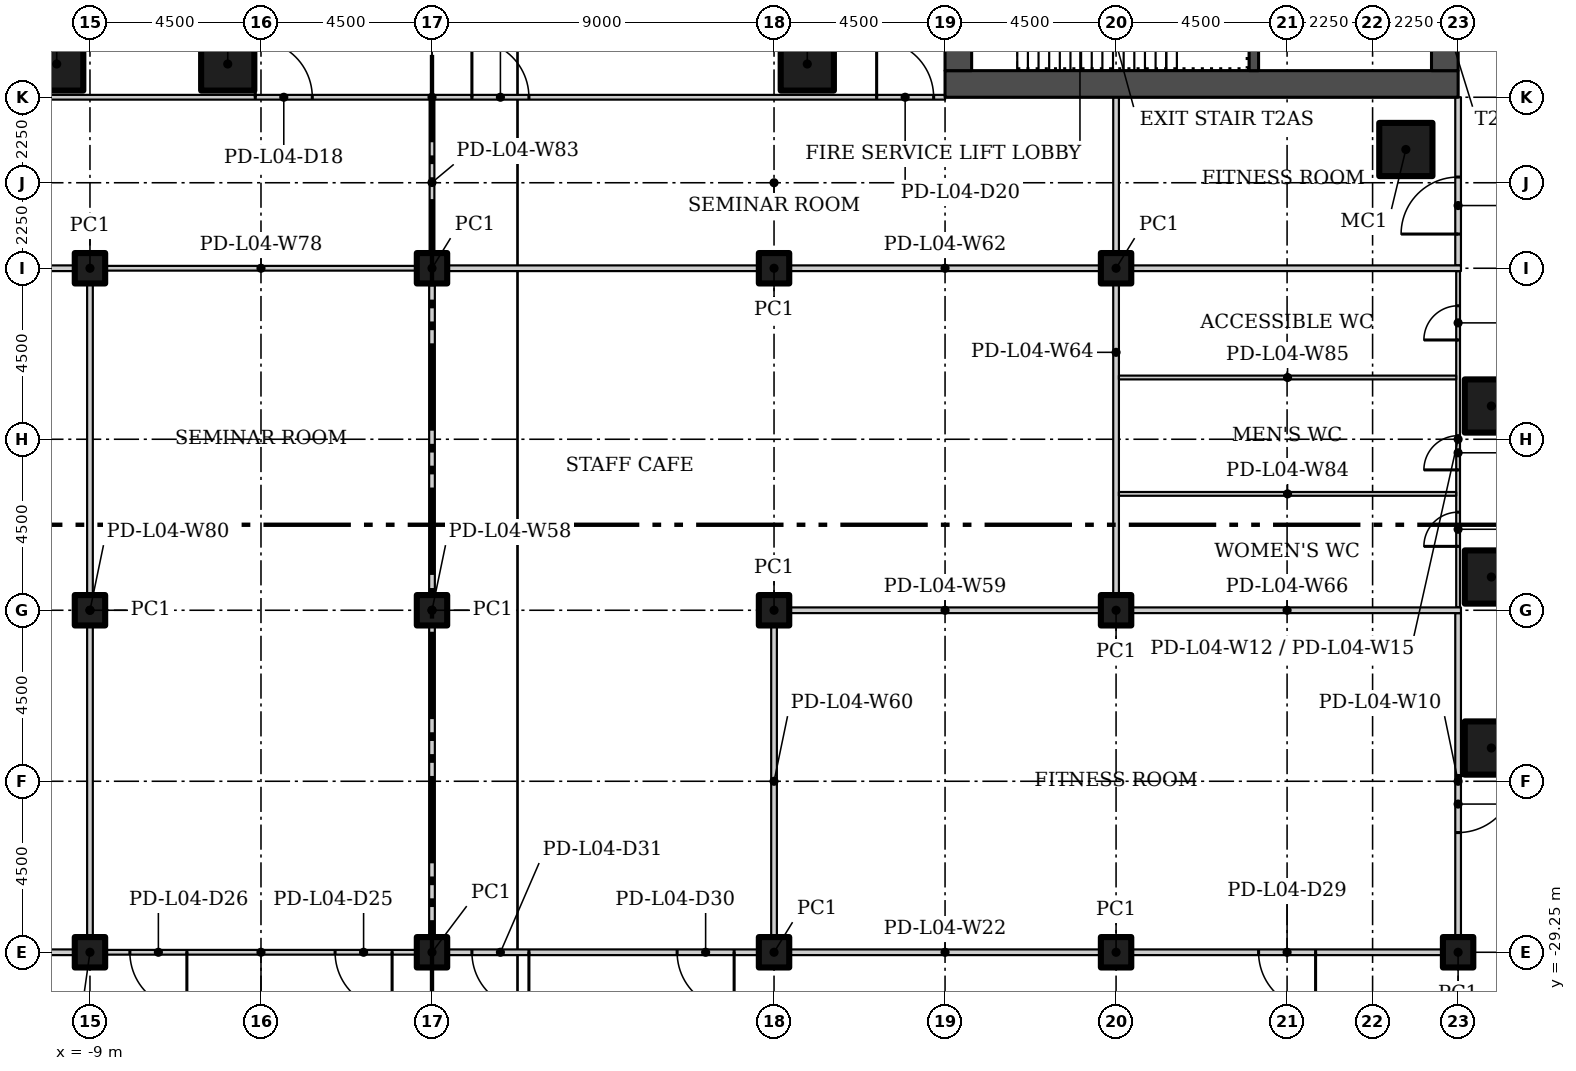
"""IFC4 building model, lengths in metres.
Left out: names, types, materials, properties, quantities, classifications, styles, units other than length and angle.
Written with IfcOpenShell. Run it as: python <this file> out.ifc"""

import sys

from ifc_helpers import new_model, si_unit, direction, frame, frame_2d, origin, origin_2d, place, context, subcontext, project, spatial, rectangle, hollow_rectangle, extrude, element, fill, save


model = new_model("IFC4")
c1 = context("Model", 3, precision=1e-05, world=origin(), true_north=direction((0.0, 1.0)))
c2 = subcontext(c1, "Body", "Model", "MODEL_VIEW")
j1 = project(units=[si_unit("LENGTHUNIT", "METRE"), si_unit("PLANEANGLEUNIT", "RADIAN")], contexts=[c1])
p1 = place(None, origin())
s1 = spatial("IfcSite", under=j1, at=p1, CompositionType="ELEMENT")
p2 = place(p1, origin())
s2 = spatial("IfcBuilding", under=s1, at=p2, CompositionType="ELEMENT")
p3 = place(p2, frame((0.0, 0.0, 23.5)))
s3 = spatial("IfcBuildingStorey", under=s2, at=p3, CompositionType="ELEMENT", Elevation=23.5)
for number, where in (
    (1, (-9.875, -5.875, 0.0)),
    (2, (-5.375, -5.875, 0.0)),
    (3, (25.625, -8.125, 0.0)),
    (4, (27.875, -14.875, 0.0)),
    (5, (27.875, -19.375, 0.0)),
    (6, (27.875, -23.875, 0.0)),
    (7, (9.875, -5.875, 0.0)),
):
    element("IfcColumn", number, at=place(p3, frame(where)), inside=s3, PredefinedType="COLUMN", context=c2, shape_type="SweptSolid", body=[
        extrude(hollow_rectangle(XDim=1.4, YDim=1.4, WallThickness=0.06, at=origin_2d()), origin(), (0.0, 0.0, 1.0), 4.65),
    ])
for number, where in (
    (8, (-9.0, -29.25, 0.0)),
    (9, (-9.0, -20.25, 0.0)),
    (10, (-9.0, -11.25, 0.0)),
    (11, (0.0, -29.25, 0.0)),
    (12, (0.0, -20.25, 0.0)),
    (13, (0.0, -11.25, 0.0)),
    (14, (9.0, -29.25, 0.0)),
    (15, (9.0, -20.25, 0.0)),
    (16, (9.0, -11.25, 0.0)),
    (17, (18.0, -29.25, 0.0)),
    (18, (18.0, -20.25, 0.0)),
    (19, (18.0, -11.25, 0.0)),
    (20, (27.0, -29.25, 0.0)),
):
    element("IfcColumn", number, at=place(p3, frame(where)), inside=s3, PredefinedType="COLUMN", context=c2, shape_type="SweptSolid", body=[
        extrude(hollow_rectangle(XDim=0.8, YDim=0.8, WallThickness=0.03, at=origin_2d()), origin(), (0.0, 0.0, 1.0), 4.65),
    ])
p4 = place(p3, frame((27.0, -20.325, 0.0), z_axis=(0.0, 0.0, 1.0), x_axis=(0.0, -1.0, 0.0)))
e21 = element("IfcWall", 21, at=p4, inside=s3, PredefinedType="PARTITIONING", context=c2, shape_type="SweptSolid", body=[
    extrude(rectangle(XDim=8.85, YDim=0.15, at=frame_2d((4.425, 0.0))), origin(), (0.0, 0.0, 1.0), 4.65),
])
p5 = place(p4, frame((4.275, 0.0, 0.0)))
e22 = element("IfcOpeningElement", 22, at=p5, cuts=e21, PredefinedType="OPENING", context=c2, shape_type="SweptSolid", body=[
    extrude(rectangle(XDim=1.5, YDim=2.1, at=frame_2d((0.75, 1.05))), frame((0.0, 0.085, 0.0), z_axis=(0.0, -1.0, 0.0), x_axis=(1.0, 0.0, 0.0)), (0.0, 0.0, 1.0), 0.17),
])
p6 = place(p3, frame((27.0, -20.175, 0.0), z_axis=(0.0, 0.0, 1.0), x_axis=(0.0, 1.0, 0.0)))
e23 = element("IfcWall", 23, at=p6, inside=s3, PredefinedType="PARTITIONING", context=c2, shape_type="SweptSolid", body=[
    extrude(rectangle(XDim=8.85, YDim=0.1, at=frame_2d((4.425, 0.0))), origin(), (0.0, 0.0, 1.0), 4.65),
])
p7 = place(p6, frame((1.606, 0.0, 0.0)))
e24 = element("IfcOpeningElement", 24, at=p7, cuts=e23, PredefinedType="OPENING", context=c2, shape_type="SweptSolid", body=[
    extrude(rectangle(XDim=0.9, YDim=2.1, at=frame_2d((0.45, 1.05))), frame((0.0, 0.06, 0.0), z_axis=(0.0, -1.0, 0.0), x_axis=(1.0, 0.0, 0.0)), (0.0, 0.0, 1.0), 0.12),
])
p8 = place(p6, frame((3.619, 0.0, 0.0)))
e25 = element("IfcOpeningElement", 25, at=p8, cuts=e23, PredefinedType="OPENING", context=c2, shape_type="SweptSolid", body=[
    extrude(rectangle(XDim=0.9, YDim=2.1, at=frame_2d((0.45, 1.05))), frame((0.0, 0.06, 0.0), z_axis=(0.0, -1.0, 0.0), x_axis=(1.0, 0.0, 0.0)), (0.0, 0.0, 1.0), 0.12),
])
p9 = place(p6, frame((7.038, 0.0, 0.0)))
e26 = element("IfcOpeningElement", 26, at=p9, cuts=e23, PredefinedType="OPENING", context=c2, shape_type="SweptSolid", body=[
    extrude(rectangle(XDim=0.9, YDim=2.1, at=frame_2d((0.45, 1.05))), frame((0.0, 0.06, 0.0), z_axis=(0.0, -1.0, 0.0), x_axis=(1.0, 0.0, 0.0)), (0.0, 0.0, 1.0), 0.12),
])
p10 = place(p3, frame((27.0, -11.175, 0.0), z_axis=(0.0, 0.0, 1.0), x_axis=(0.0, 1.0, 0.0)))
e27 = element("IfcWall", 27, at=p10, inside=s3, PredefinedType="PARTITIONING", context=c2, shape_type="SweptSolid", body=[
    extrude(rectangle(XDim=4.425, YDim=0.15, at=frame_2d((2.212, 0.0))), origin(), (0.0, 0.0, 1.0), 4.65),
])
p11 = place(p10, frame((0.825, 0.0, 0.0)))
e28 = element("IfcOpeningElement", 28, at=p11, cuts=e27, PredefinedType="OPENING", context=c2, shape_type="SweptSolid", body=[
    extrude(rectangle(XDim=1.5, YDim=2.1, at=frame_2d((0.75, 1.05))), frame((0.0, 0.085, 0.0), z_axis=(0.0, -1.0, 0.0), x_axis=(1.0, 0.0, 0.0)), (0.0, 0.0, 1.0), 0.17),
])
p12 = place(p3, frame((-13.5, -6.75, 0.0)))
e29 = element("IfcWall", 29, at=p12, inside=s3, PredefinedType="PARTITIONING", context=c2, shape_type="SweptSolid", body=[
    extrude(rectangle(XDim=27.0, YDim=0.125, at=frame_2d((13.5, 0.0))), origin(), (0.0, 0.0, 1.0), 4.65),
])
p13 = place(p12, frame((8.85, 0.0, 0.0)))
e30 = element("IfcOpeningElement", 30, at=p13, cuts=e29, PredefinedType="OPENING", context=c2, shape_type="SweptSolid", body=[
    extrude(rectangle(XDim=1.5, YDim=2.1, at=frame_2d((0.75, 1.05))), frame((0.0, 0.073, 0.0), z_axis=(0.0, -1.0, 0.0), x_axis=(1.0, 0.0, 0.0)), (0.0, 0.0, 1.0), 0.145),
])
p14 = place(p12, frame((14.55, 0.0, 0.0)))
e31 = element("IfcOpeningElement", 31, at=p14, cuts=e29, PredefinedType="OPENING", context=c2, shape_type="SweptSolid", body=[
    extrude(rectangle(XDim=1.5, YDim=2.1, at=frame_2d((0.75, 1.05))), frame((0.0, 0.073, 0.0), z_axis=(0.0, -1.0, 0.0), x_axis=(1.0, 0.0, 0.0)), (0.0, 0.0, 1.0), 0.145),
])
p15 = place(p12, frame((25.2, 0.0, 0.0)))
e32 = element("IfcOpeningElement", 32, at=p15, cuts=e29, PredefinedType="OPENING", context=c2, shape_type="SweptSolid", body=[
    extrude(rectangle(XDim=1.5, YDim=2.1, at=frame_2d((0.75, 1.05))), frame((0.0, 0.073, 0.0), z_axis=(0.0, -1.0, 0.0), x_axis=(1.0, 0.0, 0.0)), (0.0, 0.0, 1.0), 0.145),
])
p16 = place(p3, frame((27.075, -29.25, 0.0), z_axis=(0.0, 0.0, 1.0), x_axis=(-1.0, 0.0, 0.0)))
e33 = element("IfcWall", 33, at=p16, inside=s3, PredefinedType="PARTITIONING", context=c2, shape_type="SweptSolid", body=[
    extrude(rectangle(XDim=27.15, YDim=0.15, at=frame_2d((13.575, 0.0))), origin(), (0.0, 0.0, 1.0), 4.65),
])
p17 = place(p16, frame((3.825, 0.0, 0.0)))
e34 = element("IfcOpeningElement", 34, at=p17, cuts=e33, PredefinedType="OPENING", context=c2, shape_type="SweptSolid", body=[
    extrude(rectangle(XDim=1.5, YDim=2.1, at=frame_2d((0.75, 1.05))), frame((0.0, 0.085, 0.0), z_axis=(0.0, -1.0, 0.0), x_axis=(1.0, 0.0, 0.0)), (0.0, 0.0, 1.0), 0.17),
])
p18 = place(p16, frame((19.125, 0.0, 0.0)))
e35 = element("IfcOpeningElement", 35, at=p18, cuts=e33, PredefinedType="OPENING", context=c2, shape_type="SweptSolid", body=[
    extrude(rectangle(XDim=1.5, YDim=2.1, at=frame_2d((0.75, 1.05))), frame((0.0, 0.085, 0.0), z_axis=(0.0, -1.0, 0.0), x_axis=(1.0, 0.0, 0.0)), (0.0, 0.0, 1.0), 0.17),
])
p19 = place(p16, frame((24.525, 0.0, 0.0)))
e36 = element("IfcOpeningElement", 36, at=p19, cuts=e33, PredefinedType="OPENING", context=c2, shape_type="SweptSolid", body=[
    extrude(rectangle(XDim=1.5, YDim=2.1, at=frame_2d((0.75, 1.05))), frame((0.0, 0.085, 0.0), z_axis=(0.0, -1.0, 0.0), x_axis=(1.0, 0.0, 0.0)), (0.0, 0.0, 1.0), 0.17),
])
p20 = place(p3, frame((-8.925, -29.25, 0.0), z_axis=(0.0, 0.0, 1.0), x_axis=(-1.0, 0.0, 0.0)))
e37 = element("IfcWall", 37, at=p20, inside=s3, PredefinedType="PARTITIONING", context=c2, shape_type="SweptSolid", body=[
    extrude(rectangle(XDim=9.15, YDim=0.15, at=frame_2d((4.575, 0.0))), origin(), (0.0, 0.0, 1.0), 4.65),
])
p21 = place(p20, frame((1.125, 0.0, 0.0)))
e38 = element("IfcOpeningElement", 38, at=p21, cuts=e37, PredefinedType="OPENING", context=c2, shape_type="SweptSolid", body=[
    extrude(rectangle(XDim=1.5, YDim=2.1, at=frame_2d((0.75, 1.05))), frame((0.0, 0.085, 0.0), z_axis=(0.0, -1.0, 0.0), x_axis=(1.0, 0.0, 0.0)), (0.0, 0.0, 1.0), 0.17),
])
p22 = place(p20, frame((6.525, 0.0, 0.0)))
e39 = element("IfcOpeningElement", 39, at=p22, cuts=e37, PredefinedType="OPENING", context=c2, shape_type="SweptSolid", body=[
    extrude(rectangle(XDim=1.5, YDim=2.1, at=frame_2d((0.75, 1.05))), frame((0.0, 0.085, 0.0), z_axis=(0.0, -1.0, 0.0), x_axis=(1.0, 0.0, 0.0)), (0.0, 0.0, 1.0), 0.17),
])
p23 = place(p3, frame((0.075, -29.25, 0.0), z_axis=(0.0, 0.0, 1.0), x_axis=(-1.0, 0.0, 0.0)))
e40 = element("IfcWall", 40, at=p23, inside=s3, PredefinedType="PARTITIONING", context=c2, shape_type="SweptSolid", body=[
    extrude(rectangle(XDim=9.15, YDim=0.125, at=frame_2d((4.575, 0.0))), origin(), (0.0, 0.0, 1.0), 4.65),
])
p24 = place(p23, frame((1.125, 0.0, 0.0)))
e41 = element("IfcOpeningElement", 41, at=p24, cuts=e40, PredefinedType="OPENING", context=c2, shape_type="SweptSolid", body=[
    extrude(rectangle(XDim=1.5, YDim=2.1, at=frame_2d((0.75, 1.05))), frame((0.0, 0.073, 0.0), z_axis=(0.0, -1.0, 0.0), x_axis=(1.0, 0.0, 0.0)), (0.0, 0.0, 1.0), 0.145),
])
p25 = place(p23, frame((6.525, 0.0, 0.0)))
e42 = element("IfcOpeningElement", 42, at=p25, cuts=e40, PredefinedType="OPENING", context=c2, shape_type="SweptSolid", body=[
    extrude(rectangle(XDim=1.5, YDim=2.1, at=frame_2d((0.75, 1.05))), frame((0.0, 0.073, 0.0), z_axis=(0.0, -1.0, 0.0), x_axis=(1.0, 0.0, 0.0)), (0.0, 0.0, 1.0), 0.145),
])
p26 = place(p3, frame((0.0, -11.325, 0.0), z_axis=(0.0, 0.0, 1.0), x_axis=(0.0, -1.0, 0.0)))
e43 = element("IfcWall", 43, at=p26, inside=s3, PredefinedType="PARTITIONING", context=c2, shape_type="SweptSolid", body=[
    extrude(rectangle(XDim=17.85, YDim=0.15, at=frame_2d((8.925, 0.0))), origin(), (0.0, 0.0, 1.0), 4.65),
])
p27 = place(p3, frame((8.925, -20.25, 0.0)))
e44 = element("IfcWall", 44, at=p27, inside=s3, PredefinedType="PARTITIONING", context=c2, shape_type="SweptSolid", body=[
    extrude(rectangle(XDim=9.15, YDim=0.15, at=frame_2d((4.575, 0.0))), origin(), (0.0, 0.0, 1.0), 4.65),
])
p28 = place(p3, frame((9.0, -29.175, 0.0), z_axis=(0.0, 0.0, 1.0), x_axis=(0.0, 1.0, 0.0)))
e45 = element("IfcWall", 45, at=p28, inside=s3, PredefinedType="PARTITIONING", context=c2, shape_type="SweptSolid", body=[
    extrude(rectangle(XDim=8.85, YDim=0.15, at=frame_2d((4.425, 0.0))), origin(), (0.0, 0.0, 1.0), 4.65),
])
p29 = place(p3, frame((27.075, -11.25, 0.0), z_axis=(0.0, 0.0, 1.0), x_axis=(-1.0, 0.0, 0.0)))
e46 = element("IfcWall", 46, at=p29, inside=s3, PredefinedType="PARTITIONING", context=c2, shape_type="SweptSolid", body=[
    extrude(rectangle(XDim=27.15, YDim=0.15, at=frame_2d((13.575, 0.0))), origin(), (0.0, 0.0, 1.0), 4.65),
])
p30 = place(p3, frame((-8.925, -11.25, 0.0), z_axis=(0.0, 0.0, 1.0), x_axis=(-1.0, 0.0, 0.0)))
e47 = element("IfcWall", 47, at=p30, inside=s3, PredefinedType="PARTITIONING", context=c2, shape_type="SweptSolid", body=[
    extrude(rectangle(XDim=9.15, YDim=0.15, at=frame_2d((4.575, 0.0))), origin(), (0.0, 0.0, 1.0), 4.65),
])
p31 = place(p3, frame((18.0, -20.175, 0.0), z_axis=(0.0, 0.0, 1.0), x_axis=(0.0, 1.0, 0.0)))
e48 = element("IfcWall", 48, at=p31, inside=s3, PredefinedType="PARTITIONING", context=c2, shape_type="SweptSolid", body=[
    extrude(rectangle(XDim=13.425, YDim=0.15, at=frame_2d((6.712, 0.0))), origin(), (0.0, 0.0, 1.0), 4.65),
])
p32 = place(p3, frame((27.075, -20.25, 0.0), z_axis=(0.0, 0.0, 1.0), x_axis=(-1.0, 0.0, 0.0)))
e49 = element("IfcWall", 49, at=p32, inside=s3, PredefinedType="PARTITIONING", context=c2, shape_type="SweptSolid", body=[
    extrude(rectangle(XDim=9.15, YDim=0.15, at=frame_2d((4.575, 0.0))), origin(), (0.0, 0.0, 1.0), 4.65),
])
p33 = place(p3, frame((0.075, -11.25, 0.0), z_axis=(0.0, 0.0, 1.0), x_axis=(-1.0, 0.0, 0.0)))
e50 = element("IfcWall", 50, at=p33, inside=s3, PredefinedType="PARTITIONING", context=c2, shape_type="SweptSolid", body=[
    extrude(rectangle(XDim=9.15, YDim=0.125, at=frame_2d((4.575, 0.0))), origin(), (0.0, 0.0, 1.0), 4.65),
])
p34 = place(p3, frame((-9.0, -29.175, 0.0), z_axis=(0.0, 0.0, 1.0), x_axis=(0.0, 1.0, 0.0)))
e51 = element("IfcWall", 51, at=p34, inside=s3, PredefinedType="PARTITIONING", context=c2, shape_type="SweptSolid", body=[
    extrude(rectangle(XDim=17.85, YDim=0.15, at=frame_2d((8.925, 0.0))), origin(), (0.0, 0.0, 1.0), 4.65),
])
p35 = place(p3, frame((0.0, -11.175, 0.0), z_axis=(0.0, 0.0, 1.0), x_axis=(0.0, 1.0, 0.0)))
e52 = element("IfcWall", 52, at=p35, inside=s3, PredefinedType="PARTITIONING", context=c2, shape_type="SweptSolid", body=[
    extrude(rectangle(XDim=4.363, YDim=0.125, at=frame_2d((2.181, 0.0))), origin(), (0.0, 0.0, 1.0), 4.65),
])
for number, where, z_axis, x_axis in (
    (53, (26.95, -17.188, 0.0), (0.0, 0.0, 1.0), (-1.0, 0.0, 0.0)),
    (54, (26.95, -14.125, 0.0), (0.0, 0.0, 1.0), (-1.0, 0.0, 0.0)),
):
    element("IfcWall", number, at=place(p3, frame(where, z_axis=z_axis, x_axis=x_axis)), inside=s3, PredefinedType="PARTITIONING", context=c2, shape_type="SweptSolid", body=[
        extrude(rectangle(XDim=8.875, YDim=0.1, at=frame_2d((4.438, 0.0))), origin(), (0.0, 0.0, 1.0), 4.65),
    ])
p36 = place(p3, frame((13.5, -6.4, 0.0)))
e55 = element("IfcWall", 55, at=p36, inside=s3, PredefinedType="SHEAR", context=c2, shape_type="SweptSolid", body=[
    extrude(rectangle(XDim=13.5, YDim=0.7, at=frame_2d((6.75, 0.0))), origin(), (0.0, 0.0, 1.0), 4.65),
])
p37 = place(p3, frame((13.85, 6.05, 0.0), z_axis=(0.0, 0.0, 1.0), x_axis=(0.0, -1.0, 0.0)))
e56 = element("IfcWall", 56, at=p37, inside=s3, PredefinedType="SHEAR", context=c2, shape_type="SweptSolid", body=[
    extrude(rectangle(XDim=12.1, YDim=0.7, at=frame_2d((6.05, 0.0))), origin(), (0.0, 0.0, 1.0), 4.65),
])
p38 = place(p37, frame((3.9, 0.0, 0.0)))
e57 = element("IfcOpeningElement", 57, at=p38, cuts=e56, PredefinedType="OPENING", context=c2, shape_type="SweptSolid", body=[
    extrude(rectangle(XDim=1.8, YDim=2.4, at=frame_2d((0.9, 1.2))), frame((0.0, 0.36, 0.0), z_axis=(0.0, -1.0, 0.0), x_axis=(1.0, 0.0, 0.0)), (0.0, 0.0, 1.0), 0.72),
])
p39 = place(p3, frame((26.65, 6.05, 0.0), z_axis=(0.0, 0.0, 1.0), x_axis=(0.0, -1.0, 0.0)))
e58 = element("IfcWall", 58, at=p39, inside=s3, PredefinedType="SHEAR", context=c2, shape_type="SweptSolid", body=[
    extrude(rectangle(XDim=12.1, YDim=0.7, at=frame_2d((6.05, 0.0))), origin(), (0.0, 0.0, 1.0), 4.65),
])
p40 = place(p39, frame((10.1, 0.0, 0.0)))
e59 = element("IfcOpeningElement", 59, at=p40, cuts=e58, PredefinedType="OPENING", context=c2, shape_type="SweptSolid", body=[
    extrude(rectangle(XDim=1.2, YDim=2.1, at=frame_2d((0.6, 1.05))), frame((0.0, 0.36, 0.0), z_axis=(0.0, -1.0, 0.0), x_axis=(1.0, 0.0, 0.0)), (0.0, 0.0, 1.0), 0.72),
])
p41 = place(p39, frame((3.9, 0.0, 0.0)))
e60 = element("IfcOpeningElement", 60, at=p41, cuts=e58, PredefinedType="OPENING", context=c2, shape_type="SweptSolid", body=[
    extrude(rectangle(XDim=1.8, YDim=2.4, at=frame_2d((0.9, 1.2))), frame((0.0, 0.36, 0.0), z_axis=(0.0, -1.0, 0.0), x_axis=(1.0, 0.0, 0.0)), (0.0, 0.0, 1.0), 0.72),
])
p42 = place(p3, frame((21.625, -6.05, 0.0), z_axis=(0.0, 0.0, 1.0), x_axis=(0.0, 1.0, 0.0)))
e61 = element("IfcWall", 61, at=p42, inside=s3, PredefinedType="SHEAR", context=c2, shape_type="SweptSolid", body=[
    extrude(rectangle(XDim=2.55, YDim=0.25, at=frame_2d((1.275, 0.0))), origin(), (0.0, 0.0, 1.0), 4.65),
])
p43 = place(p13, origin())
e62 = element("IfcDoor", 62, at=p43, inside=s3, OperationType="DOUBLE_DOOR_SINGLE_SWING", PredefinedType="DOOR", context=c2, shape_type="SweptSolid", body=[
    extrude(rectangle(XDim=1.5, YDim=2.1, at=frame_2d((0.75, 1.05))), frame((0.0, 0.025, 0.0), z_axis=(0.0, -1.0, 0.0), x_axis=(1.0, 0.0, 0.0)), (0.0, 0.0, 1.0), 0.05),
])
fill(e30, e62)
p44 = place(p14, origin())
e63 = element("IfcDoor", 63, at=p44, inside=s3, OperationType="DOUBLE_DOOR_SINGLE_SWING", PredefinedType="DOOR", context=c2, shape_type="SweptSolid", body=[
    extrude(rectangle(XDim=1.5, YDim=2.1, at=frame_2d((0.75, 1.05))), frame((0.0, 0.025, 0.0), z_axis=(0.0, -1.0, 0.0), x_axis=(1.0, 0.0, 0.0)), (0.0, 0.0, 1.0), 0.05),
])
fill(e31, e63)
p45 = place(p15, origin())
e64 = element("IfcDoor", 64, at=p45, inside=s3, OperationType="DOUBLE_DOOR_SINGLE_SWING", PredefinedType="DOOR", context=c2, shape_type="SweptSolid", body=[
    extrude(rectangle(XDim=1.5, YDim=2.1, at=frame_2d((0.75, 1.05))), frame((0.0, 0.025, 0.0), z_axis=(0.0, -1.0, 0.0), x_axis=(1.0, 0.0, 0.0)), (0.0, 0.0, 1.0), 0.05),
])
fill(e32, e64)
p46 = place(p24, origin())
e65 = element("IfcDoor", 65, at=p46, inside=s3, OperationType="DOUBLE_DOOR_SINGLE_SWING", PredefinedType="DOOR", context=c2, shape_type="SweptSolid", body=[
    extrude(rectangle(XDim=1.5, YDim=2.1, at=frame_2d((0.75, 1.05))), frame((0.0, 0.025, 0.0), z_axis=(0.0, -1.0, 0.0), x_axis=(1.0, 0.0, 0.0)), (0.0, 0.0, 1.0), 0.05),
])
fill(e41, e65)
p47 = place(p25, origin())
e66 = element("IfcDoor", 66, at=p47, inside=s3, OperationType="DOUBLE_DOOR_SINGLE_SWING", PredefinedType="DOOR", context=c2, shape_type="SweptSolid", body=[
    extrude(rectangle(XDim=1.5, YDim=2.1, at=frame_2d((0.75, 1.05))), frame((0.0, 0.025, 0.0), z_axis=(0.0, -1.0, 0.0), x_axis=(1.0, 0.0, 0.0)), (0.0, 0.0, 1.0), 0.05),
])
fill(e42, e66)
p48 = place(p17, origin())
e67 = element("IfcDoor", 67, at=p48, inside=s3, OperationType="DOUBLE_DOOR_SINGLE_SWING", PredefinedType="DOOR", context=c2, shape_type="SweptSolid", body=[
    extrude(rectangle(XDim=1.5, YDim=2.1, at=frame_2d((0.75, 1.05))), frame((0.0, 0.025, 0.0), z_axis=(0.0, -1.0, 0.0), x_axis=(1.0, 0.0, 0.0)), (0.0, 0.0, 1.0), 0.05),
])
fill(e34, e67)
p49 = place(p18, origin())
e68 = element("IfcDoor", 68, at=p49, inside=s3, OperationType="DOUBLE_DOOR_SINGLE_SWING", PredefinedType="DOOR", context=c2, shape_type="SweptSolid", body=[
    extrude(rectangle(XDim=1.5, YDim=2.1, at=frame_2d((0.75, 1.05))), frame((0.0, 0.025, 0.0), z_axis=(0.0, -1.0, 0.0), x_axis=(1.0, 0.0, 0.0)), (0.0, 0.0, 1.0), 0.05),
])
fill(e35, e68)
p50 = place(p19, origin())
e69 = element("IfcDoor", 69, at=p50, inside=s3, OperationType="DOUBLE_DOOR_SINGLE_SWING", PredefinedType="DOOR", context=c2, shape_type="SweptSolid", body=[
    extrude(rectangle(XDim=1.5, YDim=2.1, at=frame_2d((0.75, 1.05))), frame((0.0, 0.025, 0.0), z_axis=(0.0, -1.0, 0.0), x_axis=(1.0, 0.0, 0.0)), (0.0, 0.0, 1.0), 0.05),
])
fill(e36, e69)
p51 = place(p7, origin())
e70 = element("IfcDoor", 70, at=p51, inside=s3, OperationType="SINGLE_SWING_RIGHT", PredefinedType="DOOR", context=c2, shape_type="SweptSolid", body=[
    extrude(rectangle(XDim=0.9, YDim=2.1, at=frame_2d((0.45, 1.05))), frame((0.0, 0.025, 0.0), z_axis=(0.0, -1.0, 0.0), x_axis=(1.0, 0.0, 0.0)), (0.0, 0.0, 1.0), 0.05),
])
fill(e24, e70)
p52 = place(p8, origin())
e71 = element("IfcDoor", 71, at=p52, inside=s3, OperationType="SINGLE_SWING_LEFT", PredefinedType="DOOR", context=c2, shape_type="SweptSolid", body=[
    extrude(rectangle(XDim=0.9, YDim=2.1, at=frame_2d((0.45, 1.05))), frame((0.0, 0.025, 0.0), z_axis=(0.0, -1.0, 0.0), x_axis=(1.0, 0.0, 0.0)), (0.0, 0.0, 1.0), 0.05),
])
fill(e25, e71)
p53 = place(p5, origin())
e72 = element("IfcDoor", 72, at=p53, inside=s3, OperationType="DOUBLE_DOOR_SINGLE_SWING", PredefinedType="DOOR", context=c2, shape_type="SweptSolid", body=[
    extrude(rectangle(XDim=1.5, YDim=2.1, at=frame_2d((0.75, 1.05))), frame((0.0, 0.025, 0.0), z_axis=(0.0, -1.0, 0.0), x_axis=(1.0, 0.0, 0.0)), (0.0, 0.0, 1.0), 0.05),
])
fill(e22, e72)
p54 = place(p9, origin())
e73 = element("IfcDoor", 73, at=p54, inside=s3, OperationType="SINGLE_SWING_LEFT", PredefinedType="DOOR", context=c2, shape_type="SweptSolid", body=[
    extrude(rectangle(XDim=0.9, YDim=2.1, at=frame_2d((0.45, 1.05))), frame((0.0, 0.025, 0.0), z_axis=(0.0, -1.0, 0.0), x_axis=(1.0, 0.0, 0.0)), (0.0, 0.0, 1.0), 0.05),
])
fill(e26, e73)
p55 = place(p11, origin())
e74 = element("IfcDoor", 74, at=p55, inside=s3, OperationType="DOUBLE_DOOR_SINGLE_SWING", PredefinedType="DOOR", context=c2, shape_type="SweptSolid", body=[
    extrude(rectangle(XDim=1.5, YDim=2.1, at=frame_2d((0.75, 1.05))), frame((0.0, 0.025, 0.0), z_axis=(0.0, -1.0, 0.0), x_axis=(1.0, 0.0, 0.0)), (0.0, 0.0, 1.0), 0.05),
])
fill(e28, e74)
save(model, sys.argv[1])
